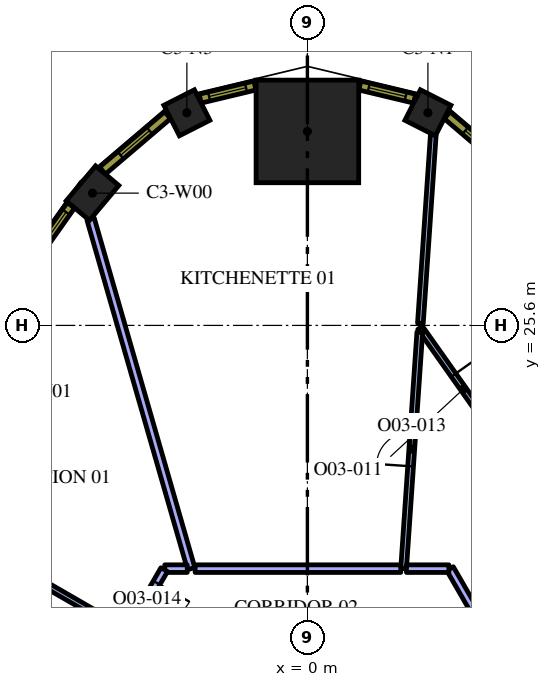
"""IFC4 building model, lengths in metres.
Left out: names, types, materials, properties, quantities, classifications, styles, units other than length and angle.
Written with IfcOpenShell. Run it as: python <this file> out.ifc"""

import sys

from ifc_helpers import new_model, si_unit, direction, frame, frame_2d, origin, origin_2d, place, context, subcontext, project, spatial, rectangle, extrude, element, fill, save


model = new_model("IFC4")
c1 = context("Model", 3, precision=1e-05, world=origin(), true_north=direction((0.0, 1.0)))
c2 = subcontext(c1, "Body", "Model", "MODEL_VIEW")
j1 = project(units=[si_unit("LENGTHUNIT", "METRE"), si_unit("PLANEANGLEUNIT", "RADIAN")], contexts=[c1])
p1 = place(None, origin())
s1 = spatial("IfcSite", under=j1, at=p1, CompositionType="ELEMENT")
p2 = place(p1, origin())
s2 = spatial("IfcBuilding", under=s1, at=p2, CompositionType="ELEMENT")
p3 = place(p2, frame((0.0, 0.0, 171.0)))
s3 = spatial("IfcBuildingStorey", under=s2, at=p3, CompositionType="ELEMENT", Elevation=171.0)
p4 = place(p3, frame((0.0, 30.704, 0.0), z_axis=(0.0, 0.0, 1.0), x_axis=(0.0, 1.0, 0.0)))
e1 = element("IfcColumn", 1, at=p4, inside=s3, PredefinedType="COLUMN", context=c2, shape_type="SweptSolid", body=[
    extrude(rectangle(XDim=2.7, YDim=2.7, at=origin_2d()), origin(), (0.0, 0.0, 1.0), 4.2),
])
for number, where, z_axis, x_axis in (
    (2, (3.171, 31.195, 0.0), (0.0, 0.0, 1.0), (-0.891, 0.453, 0.0)),
    (3, (-3.171, 31.195, 0.0), (0.0, 0.0, 1.0), (-0.891, -0.453, 0.0)),
):
    element("IfcColumn", number, at=place(p3, frame(where, z_axis=z_axis, x_axis=x_axis)), inside=s3, PredefinedType="COLUMN", context=c2, shape_type="SweptSolid", body=[
        extrude(rectangle(XDim=0.9, YDim=0.9, at=origin_2d()), origin(), (0.0, 0.0, 1.0), 4.2),
    ])
p5 = place(p3, frame((-5.654, 29.081, 0.0), z_axis=(0.0, 0.0, 1.0), x_axis=(-0.643827202606, -0.765170917629, 0.0)))
e4 = element("IfcColumn", 4, at=p5, inside=s3, PredefinedType="COLUMN", context=c2, shape_type="SweptSolid", body=[
    extrude(rectangle(XDim=1.2, YDim=0.8, at=origin_2d()), origin(), (0.0, 0.0, 1.0), 4.2),
])
p6 = place(p3, frame((2.966, 25.539, 0.0), z_axis=(0.0, 0.0, 1.0), x_axis=(0.577099839594, -0.816673603798, 0.0)))
e5 = element("IfcWall", 5, at=p6, inside=s3, PredefinedType="PARTITIONING", context=c2, shape_type="SweptSolid", body=[
    extrude(rectangle(XDim=4.025, YDim=0.15, at=frame_2d((2.013, 0.0))), origin(), (0.0, 0.0, 1.0), 3.15),
])
p7 = place(p6, frame((1.525, 0.0, 0.0)))
e6 = element("IfcOpeningElement", 6, at=p7, cuts=e5, PredefinedType="OPENING", context=c2, shape_type="SweptSolid", body=[
    extrude(rectangle(XDim=0.9, YDim=2.1, at=frame_2d((0.45, 1.05))), frame((0.0, 0.085, 0.0), z_axis=(0.0, -1.0, 0.0), x_axis=(1.0, 0.0, 0.0)), (0.0, 0.0, 1.0), 0.17),
])
p8 = place(p3, frame((2.974, 25.657, 0.0), z_axis=(0.0, 0.0, 1.0), x_axis=(0.068301586051, 0.997664719905, 0.0)))
e7 = element("IfcWall", 7, at=p8, inside=s3, PredefinedType="PARTITIONING", context=c2, shape_type="SweptSolid", body=[
    extrude(rectangle(XDim=4.972, YDim=0.15, at=frame_2d((2.486, 0.0))), origin(), (0.0, 0.0, 1.0), 3.15),
])
p9 = place(p3, frame((2.531, 19.2, 0.0), z_axis=(0.0, 0.0, 1.0), x_axis=(0.06832771358, 0.997662930832, 0.0)))
e8 = element("IfcWall", 8, at=p9, inside=s3, PredefinedType="PARTITIONING", context=c2, shape_type="SweptSolid", body=[
    extrude(rectangle(XDim=6.235, YDim=0.15, at=frame_2d((3.118, 0.0))), origin(), (0.0, 0.0, 1.0), 3.15),
])
p10 = place(p9, frame((2.7, 0.0, 0.0)))
e9 = element("IfcOpeningElement", 9, at=p10, cuts=e8, PredefinedType="OPENING", context=c2, shape_type="SweptSolid", body=[
    extrude(rectangle(XDim=0.9, YDim=2.1, at=frame_2d((0.45, 1.05))), frame((0.0, 0.085, 0.0), z_axis=(0.0, -1.0, 0.0), x_axis=(1.0, 0.0, 0.0)), (0.0, 0.0, 1.0), 0.17),
])
p11 = place(p3, frame((7.872, 12.064, 0.0), z_axis=(0.0, 0.0, 1.0), x_axis=(-0.499995192696, 0.866028179265, 0.0)))
e10 = element("IfcWall", 10, at=p11, inside=s3, PredefinedType="PARTITIONING", context=c2, shape_type="SweptSolid", body=[
    extrude(rectangle(XDim=8.239, YDim=0.2, at=frame_2d((4.12, 0.0))), origin(), (0.0, 0.0, 1.0), 3.15),
])
p12 = place(p11, frame((3.6, 0.0, 0.0)))
e11 = element("IfcOpeningElement", 11, at=p12, cuts=e10, PredefinedType="OPENING", context=c2, shape_type="SweptSolid", body=[
    extrude(rectangle(XDim=1.0, YDim=2.1, at=frame_2d((0.5, 1.05))), frame((0.0, 0.11, 0.0), z_axis=(0.0, -1.0, 0.0), x_axis=(1.0, 0.0, 0.0)), (0.0, 0.0, 1.0), 0.22),
])
p13 = place(p3, frame((3.723, 19.2, 0.0), z_axis=(0.0, 0.0, 1.0), x_axis=(-1.0, 0.0, 0.0)))
e12 = element("IfcWall", 12, at=p13, inside=s3, PredefinedType="PARTITIONING", context=c2, shape_type="SweptSolid", body=[
    extrude(rectangle(XDim=1.116, YDim=0.2, at=frame_2d((0.558, 0.0))), origin(), (0.0, 0.0, 1.0), 3.15),
])
p14 = place(p3, frame((-3.058, 19.2, 0.0), z_axis=(0.0, 0.0, 1.0), x_axis=(-0.276542988003, 0.961001548275, 0.0)))
e13 = element("IfcWall", 13, at=p14, inside=s3, PredefinedType="PARTITIONING", context=c2, shape_type="SweptSolid", body=[
    extrude(rectangle(XDim=9.573, YDim=0.2, at=frame_2d((4.786, 0.0))), origin(), (0.0, 0.0, 1.0), 3.15),
])
p15 = place(p3, frame((2.456, 19.2, 0.0), z_axis=(0.0, 0.0, 1.0), x_axis=(-1.0, 0.0, 0.0)))
e14 = element("IfcWall", 14, at=p15, inside=s3, PredefinedType="PARTITIONING", context=c2, shape_type="SweptSolid", body=[
    extrude(rectangle(XDim=5.41, YDim=0.2, at=frame_2d((2.705, 0.0))), origin(), (0.0, 0.0, 1.0), 3.15),
])
p16 = place(p3, frame((-4.719, 17.526, 0.0), z_axis=(0.0, 0.0, 1.0), x_axis=(-0.866011075544, 0.500024816419, 0.0)))
e15 = element("IfcWall", 15, at=p16, inside=s3, PredefinedType="PARTITIONING", context=c2, shape_type="SweptSolid", body=[
    extrude(rectangle(XDim=3.122, YDim=0.15, at=frame_2d((1.561, 0.0))), origin(), (0.0, 0.0, 1.0), 3.15),
])
p17 = place(p3, frame((-3.162, 19.2, 0.0), z_axis=(0.0, 0.0, 1.0), x_axis=(-1.0, 0.0, 0.0)))
e16 = element("IfcWall", 16, at=p17, inside=s3, PredefinedType="PARTITIONING", context=c2, shape_type="SweptSolid", body=[
    extrude(rectangle(XDim=0.591, YDim=0.2, at=frame_2d((0.295, 0.0))), origin(), (0.0, 0.0, 1.0), 3.15),
])
p18 = place(p3, frame((-3.768, 19.174, 0.0), z_axis=(0.0, 0.0, 1.0), x_axis=(-0.499930512259, -0.866065518833, 0.0)))
e17 = element("IfcWall", 17, at=p18, inside=s3, PredefinedType="PARTITIONING", context=c2, shape_type="SweptSolid", body=[
    extrude(rectangle(XDim=1.828, YDim=0.2, at=frame_2d((0.914, 0.0))), origin(), (0.0, 0.0, 1.0), 3.15),
])
p19 = place(p18, frame((0.4, 0.0, 0.0)))
e18 = element("IfcOpeningElement", 18, at=p19, cuts=e17, PredefinedType="OPENING", context=c2, shape_type="SweptSolid", body=[
    extrude(rectangle(XDim=1.0, YDim=2.1, at=frame_2d((0.5, 1.05))), frame((0.0, 0.11, 0.0), z_axis=(0.0, -1.0, 0.0), x_axis=(1.0, 0.0, 0.0)), (0.0, 0.0, 1.0), 0.22),
])
p20 = place(p3, frame((5.392, 29.672, 0.0), z_axis=(0.0, 0.0, 1.0), x_axis=(-0.761419744247, 0.648259186645, 0.0)))
e19 = element("IfcWall", 19, at=p20, inside=s3, PredefinedType="SOLIDWALL", context=c2, shape_type="SweptSolid", body=[
    extrude(rectangle(XDim=2.25, YDim=0.24, at=frame_2d((1.125, 0.0))), origin(), (0.0, 0.0, 1.0), 3.95),
])
p21 = place(p20, frame((0.625, 0.0, 0.9)))
e20 = element("IfcOpeningElement", 20, at=p21, cuts=e19, PredefinedType="OPENING", context=c2, shape_type="SweptSolid", body=[
    extrude(rectangle(XDim=1.0, YDim=2.55, at=frame_2d((0.5, 1.275))), frame((0.0, 0.13, 0.0), z_axis=(0.0, -1.0, 0.0), x_axis=(1.0, 0.0, 0.0)), (0.0, 0.0, 1.0), 0.26),
])
p22 = place(p3, frame((2.821, 31.566, 0.0), z_axis=(0.0, 0.0, 1.0), x_axis=(-0.972479955788, 0.232986556673, 0.0)))
e21 = element("IfcWall", 21, at=p22, inside=s3, PredefinedType="SOLIDWALL", context=c2, shape_type="SweptSolid", body=[
    extrude(rectangle(XDim=1.482, YDim=0.24, at=frame_2d((0.741, 0.0))), origin(), (0.0, 0.0, 1.0), 3.95),
])
p23 = place(p22, frame((0.241, 0.0, 0.9)))
e22 = element("IfcOpeningElement", 22, at=p23, cuts=e21, PredefinedType="OPENING", context=c2, shape_type="SweptSolid", body=[
    extrude(rectangle(XDim=1.0, YDim=2.55, at=frame_2d((0.5, 1.275))), frame((0.0, 0.13, 0.0), z_axis=(0.0, -1.0, 0.0), x_axis=(1.0, 0.0, 0.0)), (0.0, 0.0, 1.0), 0.26),
])
p24 = place(p3, frame((-1.38, 31.912, 0.0), z_axis=(0.0, 0.0, 1.0), x_axis=(-0.972479955788, -0.232986556673, 0.0)))
e23 = element("IfcWall", 23, at=p24, inside=s3, PredefinedType="SOLIDWALL", context=c2, shape_type="SweptSolid", body=[
    extrude(rectangle(XDim=1.482, YDim=0.24, at=frame_2d((0.741, 0.0))), origin(), (0.0, 0.0, 1.0), 3.95),
])
p25 = place(p24, frame((0.241, 0.0, 0.9)))
e24 = element("IfcOpeningElement", 24, at=p25, cuts=e23, PredefinedType="OPENING", context=c2, shape_type="SweptSolid", body=[
    extrude(rectangle(XDim=1.0, YDim=2.55, at=frame_2d((0.5, 1.275))), frame((0.0, 0.13, 0.0), z_axis=(0.0, -1.0, 0.0), x_axis=(1.0, 0.0, 0.0)), (0.0, 0.0, 1.0), 0.26),
])
p26 = place(p3, frame((-3.678, 31.131, 0.0), z_axis=(0.0, 0.0, 1.0), x_axis=(-0.761419744247, -0.648259186645, 0.0)))
e25 = element("IfcWall", 25, at=p26, inside=s3, PredefinedType="SOLIDWALL", context=c2, shape_type="SweptSolid", body=[
    extrude(rectangle(XDim=2.25, YDim=0.24, at=frame_2d((1.125, 0.0))), origin(), (0.0, 0.0, 1.0), 3.95),
])
p27 = place(p26, frame((0.625, 0.0, 0.9)))
e26 = element("IfcOpeningElement", 26, at=p27, cuts=e25, PredefinedType="OPENING", context=c2, shape_type="SweptSolid", body=[
    extrude(rectangle(XDim=1.0, YDim=2.55, at=frame_2d((0.5, 1.275))), frame((0.0, 0.13, 0.0), z_axis=(0.0, -1.0, 0.0), x_axis=(1.0, 0.0, 0.0)), (0.0, 0.0, 1.0), 0.26),
])
p28 = place(p3, frame((-6.223, 28.762, 0.0), z_axis=(0.0, 0.0, 1.0), x_axis=(-0.577115207679, -0.816662743772, 0.0)))
e27 = element("IfcWall", 27, at=p28, inside=s3, PredefinedType="SOLIDWALL", context=c2, shape_type="SweptSolid", body=[
    extrude(rectangle(XDim=5.213, YDim=0.24, at=frame_2d((2.606, 0.0))), origin(), (0.0, 0.0, 1.0), 3.95),
])
p29 = place(p28, frame((0.221, 0.0, 0.9)))
e28 = element("IfcOpeningElement", 28, at=p29, cuts=e27, PredefinedType="OPENING", context=c2, shape_type="SweptSolid", body=[
    extrude(rectangle(XDim=1.5, YDim=2.55, at=frame_2d((0.75, 1.275))), frame((0.0, 0.13, 0.0), z_axis=(0.0, -1.0, 0.0), x_axis=(1.0, 0.0, 0.0)), (0.0, 0.0, 1.0), 0.26),
])
p30 = place(p28, frame((3.452, 0.0, 0.9)))
e29 = element("IfcOpeningElement", 29, at=p30, cuts=e27, PredefinedType="OPENING", context=c2, shape_type="SweptSolid", body=[
    extrude(rectangle(XDim=1.5, YDim=2.55, at=frame_2d((0.75, 1.275))), frame((0.0, 0.13, 0.0), z_axis=(0.0, -1.0, 0.0), x_axis=(1.0, 0.0, 0.0)), (0.0, 0.0, 1.0), 0.26),
])
p31 = place(p7, origin())
e30 = element("IfcDoor", 30, at=p31, inside=s3, OperationType="SINGLE_SWING_LEFT", PredefinedType="DOOR", context=c2, shape_type="SweptSolid", body=[
    extrude(rectangle(XDim=0.9, YDim=2.1, at=frame_2d((0.45, 1.05))), frame((0.0, 0.025, 0.0), z_axis=(0.0, -1.0, 0.0), x_axis=(1.0, 0.0, 0.0)), (0.0, 0.0, 1.0), 0.05),
])
fill(e6, e30)
p32 = place(p10, origin())
e31 = element("IfcDoor", 31, at=p32, inside=s3, OperationType="SINGLE_SWING_RIGHT", PredefinedType="DOOR", context=c2, shape_type="SweptSolid", body=[
    extrude(rectangle(XDim=0.9, YDim=2.1, at=frame_2d((0.45, 1.05))), frame((0.0, 0.025, 0.0), z_axis=(0.0, -1.0, 0.0), x_axis=(1.0, 0.0, 0.0)), (0.0, 0.0, 1.0), 0.05),
])
fill(e9, e31)
p33 = place(p19, origin())
e32 = element("IfcDoor", 32, at=p33, inside=s3, OperationType="SINGLE_SWING_LEFT", PredefinedType="DOOR", context=c2, shape_type="SweptSolid", body=[
    extrude(rectangle(XDim=1.0, YDim=2.1, at=frame_2d((0.5, 1.05))), frame((0.0, 0.025, 0.0), z_axis=(0.0, -1.0, 0.0), x_axis=(1.0, 0.0, 0.0)), (0.0, 0.0, 1.0), 0.05),
])
fill(e18, e32)
p34 = place(p21, origin())
e33 = element("IfcWindow", 33, at=p34, inside=s3, PartitioningType="SINGLE_PANEL", PredefinedType="WINDOW", context=c2, shape_type="SweptSolid", body=[
    extrude(rectangle(XDim=1.0, YDim=2.55, at=frame_2d((0.5, 1.275))), frame((0.0, 0.04, 0.0), z_axis=(0.0, -1.0, 0.0), x_axis=(1.0, 0.0, 0.0)), (0.0, 0.0, 1.0), 0.06),
])
fill(e20, e33)
p35 = place(p23, origin())
e34 = element("IfcWindow", 34, at=p35, inside=s3, PartitioningType="SINGLE_PANEL", PredefinedType="WINDOW", context=c2, shape_type="SweptSolid", body=[
    extrude(rectangle(XDim=1.0, YDim=2.55, at=frame_2d((0.5, 1.275))), frame((0.0, 0.04, 0.0), z_axis=(0.0, -1.0, 0.0), x_axis=(1.0, 0.0, 0.0)), (0.0, 0.0, 1.0), 0.06),
])
fill(e22, e34)
p36 = place(p25, origin())
e35 = element("IfcWindow", 35, at=p36, inside=s3, PartitioningType="SINGLE_PANEL", PredefinedType="WINDOW", context=c2, shape_type="SweptSolid", body=[
    extrude(rectangle(XDim=1.0, YDim=2.55, at=frame_2d((0.5, 1.275))), frame((0.0, 0.04, 0.0), z_axis=(0.0, -1.0, 0.0), x_axis=(1.0, 0.0, 0.0)), (0.0, 0.0, 1.0), 0.06),
])
fill(e24, e35)
p37 = place(p27, origin())
e36 = element("IfcWindow", 36, at=p37, inside=s3, PartitioningType="SINGLE_PANEL", PredefinedType="WINDOW", context=c2, shape_type="SweptSolid", body=[
    extrude(rectangle(XDim=1.0, YDim=2.55, at=frame_2d((0.5, 1.275))), frame((0.0, 0.04, 0.0), z_axis=(0.0, -1.0, 0.0), x_axis=(1.0, 0.0, 0.0)), (0.0, 0.0, 1.0), 0.06),
])
fill(e26, e36)
p38 = place(p29, origin())
e37 = element("IfcWindow", 37, at=p38, inside=s3, PartitioningType="SINGLE_PANEL", PredefinedType="WINDOW", context=c2, shape_type="SweptSolid", body=[
    extrude(rectangle(XDim=1.5, YDim=2.55, at=frame_2d((0.75, 1.275))), frame((0.0, 0.04, 0.0), z_axis=(0.0, -1.0, 0.0), x_axis=(1.0, 0.0, 0.0)), (0.0, 0.0, 1.0), 0.06),
])
fill(e28, e37)
save(model, sys.argv[1])
